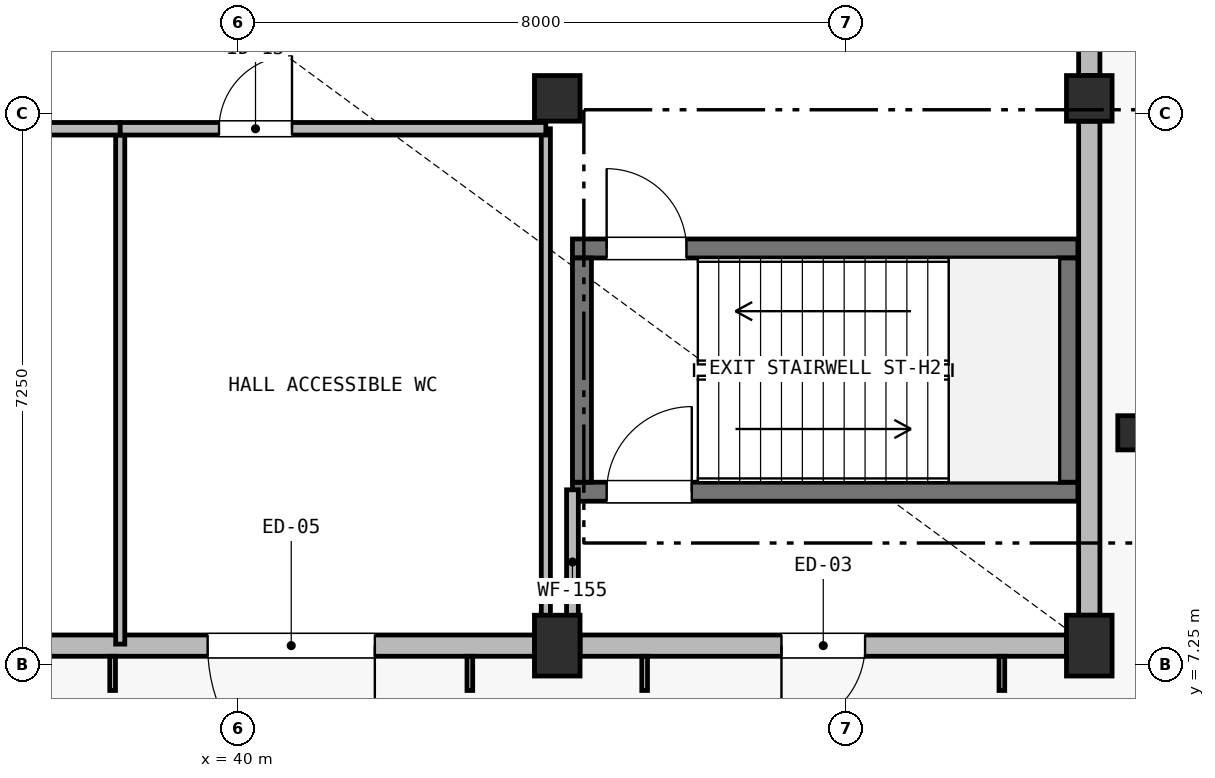
"""IFC4 building model, lengths in metres.
Left out: names, types, materials, properties, quantities, classifications, styles, units other than length and angle.
Written with IfcOpenShell. Run it as: python <this file> out.ifc"""

import sys

from ifc_helpers import new_model, si_unit, direction, frame, frame_2d, origin, origin_2d, place, context, subcontext, project, spatial, rectangle, circle, extrude, element, fill, save


model = new_model("IFC4")
c1 = context("Model", 3, precision=1e-05, world=origin(), true_north=direction((0.0, 1.0)))
c2 = subcontext(c1, "Body", "Model", "MODEL_VIEW")
j1 = project(units=[si_unit("LENGTHUNIT", "METRE"), si_unit("PLANEANGLEUNIT", "RADIAN")], contexts=[c1])
p1 = place(None, origin())
s1 = spatial("IfcSite", under=j1, at=p1, CompositionType="ELEMENT")
p2 = place(p1, origin())
s2 = spatial("IfcBuilding", under=s1, at=p2, CompositionType="ELEMENT")
p3 = place(p2, origin())
s3 = spatial("IfcBuildingStorey", under=s2, at=p3, CompositionType="ELEMENT", Elevation=0.0)
p4 = place(p3, frame((44.2, 7.5, -0.35), z_axis=(0.0, 0.0, 1.0), x_axis=(1.0, 0.0, 0.0)))
e1 = element("IfcColumn", 1, at=p4, inside=s3, PredefinedType="COLUMN", context=c2, shape_type="SweptSolid", body=[
    extrude(rectangle(XDim=0.6, YDim=0.8, at=origin_2d()), origin(), (0.0, 0.0, 1.0), 4.85),
])
p5 = place(p3, frame((44.2, 14.7, -0.35), z_axis=(0.0, 0.0, 1.0), x_axis=(1.0, 0.0, 0.0)))
e2 = element("IfcColumn", 2, at=p5, inside=s3, PredefinedType="COLUMN", context=c2, shape_type="SweptSolid", body=[
    extrude(circle(Radius=0.3, at=origin_2d()), origin(), (0.0, 0.0, 1.0), 4.55),
])
p6 = place(p3, frame((51.2, 7.5, -0.35), z_axis=(0.0, 0.0, 1.0), x_axis=(1.0, 0.0, 0.0)))
e3 = element("IfcColumn", 3, at=p6, inside=s3, PredefinedType="COLUMN", context=c2, shape_type="SweptSolid", body=[
    extrude(rectangle(XDim=0.6, YDim=0.8, at=origin_2d()), origin(), (0.0, 0.0, 1.0), 4.85),
])
p7 = place(p3, frame((51.2, 14.7, -0.35), z_axis=(0.0, 0.0, 1.0), x_axis=(1.0, 0.0, 0.0)))
e4 = element("IfcColumn", 4, at=p7, inside=s3, PredefinedType="COLUMN", context=c2, shape_type="SweptSolid", body=[
    extrude(circle(Radius=0.3, at=origin_2d()), origin(), (0.0, 0.0, 1.0), 4.55),
])
p8 = place(p3, frame((44.4, 12.725, -0.35), z_axis=(0.0, 0.0, 1.0), x_axis=(1.0, 0.0, 0.0)))
e5 = element("IfcWall", 5, at=p8, inside=s3, PredefinedType="SHEAR", context=c2, shape_type="SweptSolid", body=[
    extrude(rectangle(XDim=6.65, YDim=0.25, at=frame_2d((3.325, 0.0))), origin(), (0.0, 0.0, 1.0), 4.85),
])
p9 = place(p8, frame((0.45, 0.0, 0.35)))
e6 = element("IfcOpeningElement", 6, at=p9, cuts=e5, PredefinedType="OPENING", context=c2, shape_type="SweptSolid", body=[
    extrude(rectangle(XDim=1.05, YDim=2.15, at=frame_2d((0.525, 1.075))), frame((0.0, 0.14, 0.0), z_axis=(0.0, -1.0, 0.0), x_axis=(1.0, 0.0, 0.0)), (0.0, 0.0, 1.0), 0.28),
])
p10 = place(p3, frame((44.4, 9.525, -0.35), z_axis=(0.0, 0.0, 1.0), x_axis=(1.0, 0.0, 0.0)))
e7 = element("IfcWall", 7, at=p10, inside=s3, PredefinedType="SHEAR", context=c2, shape_type="SweptSolid", body=[
    extrude(rectangle(XDim=6.65, YDim=0.25, at=frame_2d((3.325, 0.0))), origin(), (0.0, 0.0, 1.0), 4.85),
])
p11 = place(p10, frame((0.45, 0.0, 0.35)))
e8 = element("IfcOpeningElement", 8, at=p11, cuts=e7, PredefinedType="OPENING", context=c2, shape_type="SweptSolid", body=[
    extrude(rectangle(XDim=1.12, YDim=2.15, at=frame_2d((0.56, 1.075))), frame((0.0, 0.14, 0.0), z_axis=(0.0, -1.0, 0.0), x_axis=(1.0, 0.0, 0.0)), (0.0, 0.0, 1.0), 0.28),
])
for number, where, z_axis, x_axis in (
    (9, (44.525, 9.65, -0.35), (0.0, 0.0, 1.0), (0.0, 1.0, 0.0)),
    (10, (50.925, 9.65, -0.35), (0.0, 0.0, 1.0), (0.0, 1.0, 0.0)),
):
    element("IfcWall", number, at=place(p3, frame(where, z_axis=z_axis, x_axis=x_axis)), inside=s3, PredefinedType="SHEAR", context=c2, shape_type="SweptSolid", body=[
        extrude(rectangle(XDim=2.95, YDim=0.25, at=frame_2d((1.475, 0.0))), origin(), (0.0, 0.0, 1.0), 4.85),
    ])
p12 = place(p3, frame((51.8, 10.3, -0.35), z_axis=(0.0, 0.0, 1.0), x_axis=(1.0, 0.0, 0.0)))
e11 = element("IfcColumn", 11, at=p12, inside=s3, PredefinedType="COLUMN", context=c2, shape_type="SweptSolid", body=[
    extrude(rectangle(XDim=0.45, YDim=0.45, at=origin_2d()), origin(), (0.0, 0.0, 1.0), 4.65),
])
p13 = place(p3, frame((43.9, 7.5, 0.0), z_axis=(0.0, 0.0, 1.0), x_axis=(-1.0, 0.0, 0.0)))
e12 = element("IfcWall", 12, at=p13, inside=s3, PredefinedType="SOLIDWALL", context=c2, shape_type="SweptSolid", body=[
    extrude(rectangle(XDim=6.4, YDim=0.28, at=frame_2d((3.2, 0.0))), origin(), (0.0, 0.0, 1.0), 3.65),
])
p14 = place(p13, frame((2.1, 0.0, 0.0)))
e13 = element("IfcOpeningElement", 13, at=p14, cuts=e12, PredefinedType="OPENING", context=c2, shape_type="SweptSolid", body=[
    extrude(rectangle(XDim=2.2, YDim=2.5, at=frame_2d((1.1, 1.25))), frame((0.0, 0.155, 0.0), z_axis=(0.0, -1.0, 0.0), x_axis=(1.0, 0.0, 0.0)), (0.0, 0.0, 1.0), 0.31),
])
p15 = place(p3, frame((50.9, 7.5, 0.0), z_axis=(0.0, 0.0, 1.0), x_axis=(-1.0, 0.0, 0.0)))
e14 = element("IfcWall", 14, at=p15, inside=s3, PredefinedType="SOLIDWALL", context=c2, shape_type="SweptSolid", body=[
    extrude(rectangle(XDim=6.4, YDim=0.28, at=frame_2d((3.2, 0.0))), origin(), (0.0, 0.0, 1.0), 3.65),
])
p16 = place(p15, frame((2.65, 0.0, 0.0)))
e15 = element("IfcOpeningElement", 15, at=p16, cuts=e14, PredefinedType="OPENING", context=c2, shape_type="SweptSolid", body=[
    extrude(rectangle(XDim=1.1, YDim=2.15, at=frame_2d((0.55, 1.075))), frame((0.0, 0.155, 0.0), z_axis=(0.0, -1.0, 0.0), x_axis=(1.0, 0.0, 0.0)), (0.0, 0.0, 1.0), 0.31),
])
p17 = place(p3, frame((51.2, 14.4, 0.0), z_axis=(0.0, 0.0, 1.0), x_axis=(0.0, -1.0, 0.0)))
e16 = element("IfcWall", 16, at=p17, inside=s3, PredefinedType="SOLIDWALL", context=c2, shape_type="SweptSolid", body=[
    extrude(rectangle(XDim=6.5, YDim=0.28, at=frame_2d((3.25, 0.0))), origin(), (0.0, 0.0, 1.0), 3.65),
])
p18 = place(p3, frame((51.2, 43.1, 0.0), z_axis=(0.0, 0.0, 1.0), x_axis=(0.0, -1.0, 0.0)))
e17 = element("IfcWall", 17, at=p18, inside=s3, PredefinedType="SOLIDWALL", context=c2, shape_type="SweptSolid", body=[
    extrude(rectangle(XDim=28.1, YDim=0.28, at=frame_2d((14.05, 0.0))), origin(), (0.0, 0.0, 1.0), 7.38),
])
p19 = place(p18, frame((2.2, 0.0, 3.2)))
e18 = element("IfcOpeningElement", 18, at=p19, cuts=e17, PredefinedType="OPENING", context=c2, shape_type="SweptSolid", body=[
    extrude(rectangle(XDim=0.64, YDim=2.18, at=frame_2d((0.32, 1.09))), frame((0.0, 0.155, 0.0), z_axis=(0.0, -1.0, 0.0), x_axis=(1.0, 0.0, 0.0)), (0.0, 0.0, 1.0), 0.31),
])
p20 = place(p18, frame((5.2, 0.0, 3.2)))
e19 = element("IfcOpeningElement", 19, at=p20, cuts=e17, PredefinedType="OPENING", context=c2, shape_type="SweptSolid", body=[
    extrude(rectangle(XDim=0.7, YDim=2.36, at=frame_2d((0.35, 1.18))), frame((0.0, 0.155, 0.0), z_axis=(0.0, -1.0, 0.0), x_axis=(1.0, 0.0, 0.0)), (0.0, 0.0, 1.0), 0.31),
])
p21 = place(p18, frame((14.5, 0.0, 3.2)))
e20 = element("IfcOpeningElement", 20, at=p21, cuts=e17, PredefinedType="OPENING", context=c2, shape_type="SweptSolid", body=[
    extrude(rectangle(XDim=0.76, YDim=2.34, at=frame_2d((0.38, 1.17))), frame((0.0, 0.155, 0.0), z_axis=(0.0, -1.0, 0.0), x_axis=(1.0, 0.0, 0.0)), (0.0, 0.0, 1.0), 0.31),
])
p22 = place(p18, frame((19.0, 0.0, 3.2)))
e21 = element("IfcOpeningElement", 21, at=p22, cuts=e17, PredefinedType="OPENING", context=c2, shape_type="SweptSolid", body=[
    extrude(rectangle(XDim=0.82, YDim=2.18, at=frame_2d((0.41, 1.09))), frame((0.0, 0.155, 0.0), z_axis=(0.0, -1.0, 0.0), x_axis=(1.0, 0.0, 0.0)), (0.0, 0.0, 1.0), 0.31),
])
p23 = place(p18, frame((23.5, 0.0, 3.2)))
e22 = element("IfcOpeningElement", 22, at=p23, cuts=e17, PredefinedType="OPENING", context=c2, shape_type="SweptSolid", body=[
    extrude(rectangle(XDim=0.58, YDim=2.16, at=frame_2d((0.29, 1.08))), frame((0.0, 0.155, 0.0), z_axis=(0.0, -1.0, 0.0), x_axis=(1.0, 0.0, 0.0)), (0.0, 0.0, 1.0), 0.31),
])
p24 = place(p3, frame((44.4, 7.65, 0.0), z_axis=(0.0, 0.0, 1.0), x_axis=(0.0, 1.0, 0.0)))
e23 = element("IfcWall", 23, at=p24, inside=s3, PredefinedType="PARTITIONING", context=c2, shape_type="SweptSolid", body=[
    extrude(rectangle(XDim=1.9, YDim=0.155, at=frame_2d((0.95, 0.0))), origin(), (0.0, 0.0, 1.0), 3.667),
])
p25 = place(p3, frame((38.45, 7.52, 0.0), z_axis=(0.0, 0.0, 1.0), x_axis=(0.0, 1.0, 0.0)))
e24 = element("IfcWall", 24, at=p25, inside=s3, PredefinedType="PARTITIONING", context=c2, shape_type="SweptSolid", body=[
    extrude(rectangle(XDim=6.78, YDim=0.12, at=frame_2d((3.39, 0.0))), origin(), (0.0, 0.0, 1.0), 4.18),
])
p26 = place(p3, frame((44.05, 7.65, 0.0), z_axis=(0.0, 0.0, 1.0), x_axis=(0.0, 1.0, 0.0)))
e25 = element("IfcWall", 25, at=p26, inside=s3, PredefinedType="PARTITIONING", context=c2, shape_type="SweptSolid", body=[
    extrude(rectangle(XDim=6.65, YDim=0.12, at=frame_2d((3.325, 0.0))), origin(), (0.0, 0.0, 1.0), 3.667),
])
p27 = place(p3, frame((32.05, 14.3, 0.0), z_axis=(0.0, 0.0, 1.0), x_axis=(1.0, 0.0, 0.0)))
e26 = element("IfcWall", 26, at=p27, inside=s3, PredefinedType="PLUMBINGWALL", context=c2, shape_type="SweptSolid", body=[
    extrude(rectangle(XDim=6.4, YDim=0.165, at=frame_2d((3.2, 0.0))), origin(), (0.0, 0.0, 1.0), 4.18),
])
p28 = place(p27, frame((1.4, 0.0, 0.0)))
e27 = element("IfcOpeningElement", 27, at=p28, cuts=e26, PredefinedType="OPENING", context=c2, shape_type="SweptSolid", body=[
    extrude(rectangle(XDim=0.86, YDim=2.1, at=frame_2d((0.43, 1.05))), frame((0.0, 0.097, 0.0), z_axis=(0.0, -1.0, 0.0), x_axis=(1.0, 0.0, 0.0)), (0.0, 0.0, 1.0), 0.195),
])
p29 = place(p3, frame((38.45, 14.3, 0.0), z_axis=(0.0, 0.0, 1.0), x_axis=(1.0, 0.0, 0.0)))
e28 = element("IfcWall", 28, at=p29, inside=s3, PredefinedType="PLUMBINGWALL", context=c2, shape_type="SweptSolid", body=[
    extrude(rectangle(XDim=5.6, YDim=0.165, at=frame_2d((2.8, 0.0))), origin(), (0.0, 0.0, 1.0), 4.18),
])
p30 = place(p29, frame((1.3, 0.0, 0.0)))
e29 = element("IfcOpeningElement", 29, at=p30, cuts=e28, PredefinedType="OPENING", context=c2, shape_type="SweptSolid", body=[
    extrude(rectangle(XDim=0.96, YDim=2.12, at=frame_2d((0.48, 1.06))), frame((0.0, 0.097, 0.0), z_axis=(0.0, -1.0, 0.0), x_axis=(1.0, 0.0, 0.0)), (0.0, 0.0, 1.0), 0.195),
])
p31 = place(p14, origin())
e30 = element("IfcDoor", 30, at=p31, inside=s3, OperationType="DOUBLE_DOOR_SINGLE_SWING", PredefinedType="DOOR", context=c2, shape_type="SweptSolid", body=[
    extrude(rectangle(XDim=2.2, YDim=2.5, at=frame_2d((1.1, 1.25))), frame((0.0, 0.025, 0.0), z_axis=(0.0, -1.0, 0.0), x_axis=(1.0, 0.0, 0.0)), (0.0, 0.0, 1.0), 0.05),
])
fill(e13, e30)
p32 = place(p16, origin())
e31 = element("IfcDoor", 31, at=p32, inside=s3, OperationType="SINGLE_SWING_RIGHT", PredefinedType="DOOR", context=c2, shape_type="SweptSolid", body=[
    extrude(rectangle(XDim=1.1, YDim=2.15, at=frame_2d((0.55, 1.075))), frame((0.0, 0.025, 0.0), z_axis=(0.0, -1.0, 0.0), x_axis=(1.0, 0.0, 0.0)), (0.0, 0.0, 1.0), 0.05),
])
fill(e15, e31)
p33 = place(p30, origin())
e32 = element("IfcDoor", 32, at=p33, inside=s3, OperationType="SINGLE_SWING_RIGHT", PredefinedType="DOOR", context=c2, shape_type="SweptSolid", body=[
    extrude(rectangle(XDim=0.96, YDim=2.12, at=frame_2d((0.48, 1.06))), frame((0.0, 0.025, 0.0), z_axis=(0.0, -1.0, 0.0), x_axis=(1.0, 0.0, 0.0)), (0.0, 0.0, 1.0), 0.05),
])
fill(e29, e32)
p34 = place(p9, origin())
e33 = element("IfcDoor", 33, at=p34, inside=s3, OperationType="SINGLE_SWING_LEFT", PredefinedType="DOOR", context=c2, shape_type="SweptSolid", body=[
    extrude(rectangle(XDim=1.05, YDim=2.15, at=frame_2d((0.525, 1.075))), frame((0.0, 0.025, 0.0), z_axis=(0.0, -1.0, 0.0), x_axis=(1.0, 0.0, 0.0)), (0.0, 0.0, 1.0), 0.05),
])
fill(e6, e33)
p35 = place(p11, origin())
e34 = element("IfcDoor", 34, at=p35, inside=s3, OperationType="SINGLE_SWING_RIGHT", PredefinedType="DOOR", context=c2, shape_type="SweptSolid", body=[
    extrude(rectangle(XDim=1.12, YDim=2.15, at=frame_2d((0.56, 1.075))), frame((0.0, 0.025, 0.0), z_axis=(0.0, -1.0, 0.0), x_axis=(1.0, 0.0, 0.0)), (0.0, 0.0, 1.0), 0.05),
])
fill(e8, e34)
save(model, sys.argv[1])
